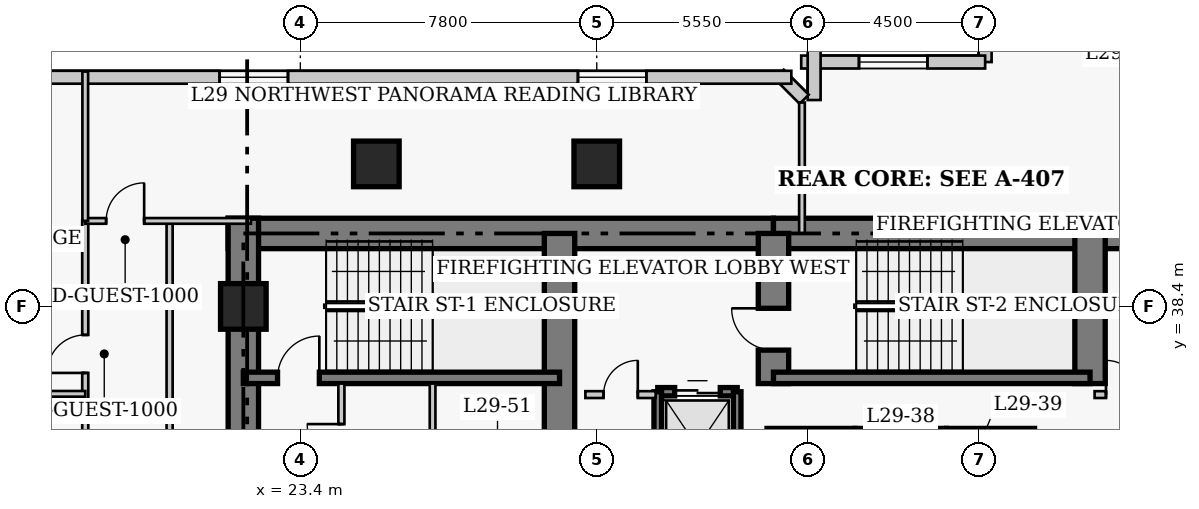
"""IFC4 building model, lengths in metres.
Left out: names, types, materials, properties, quantities, classifications, styles, units other than length and angle.
Written with IfcOpenShell. Run it as: python <this file> out.ifc"""

import sys

from ifc_helpers import new_model, si_unit, direction, frame, frame_2d, origin, origin_2d, place, context, subcontext, project, spatial, rectangle, extrude, element, fill, save


model = new_model("IFC4")
c1 = context("Model", 3, precision=1e-05, world=origin(), true_north=direction((0.0, 1.0)))
c2 = subcontext(c1, "Body", "Model", "MODEL_VIEW")
j1 = project(units=[si_unit("LENGTHUNIT", "METRE"), si_unit("PLANEANGLEUNIT", "RADIAN")], contexts=[c1])
p1 = place(None, origin())
s1 = spatial("IfcSite", under=j1, at=p1, CompositionType="ELEMENT")
p2 = place(p1, origin())
s2 = spatial("IfcBuilding", under=s1, at=p2, CompositionType="ELEMENT")
p3 = place(p2, frame((0.0, 0.0, 118.4)))
s3 = spatial("IfcBuildingStorey", under=s2, at=p3, CompositionType="ELEMENT", Elevation=118.4)
p4 = place(p3, frame((21.5, 40.32, 0.0), z_axis=(0.0, 0.0, 1.0), x_axis=(1.0, 0.0, 0.0)))
e1 = element("IfcWall", 1, at=p4, inside=s3, PredefinedType="SHEAR", context=c2, shape_type="SweptSolid", body=[
    extrude(rectangle(XDim=14.35, YDim=0.8, at=frame_2d((7.175, 0.0))), origin(), (0.0, 0.0, 1.0), 3.8),
])
p5 = place(p3, frame((35.85, 40.32, 0.0), z_axis=(0.0, 0.0, 1.0), x_axis=(1.0, 0.0, 0.0)))
e2 = element("IfcWall", 2, at=p5, inside=s3, PredefinedType="SHEAR", context=c2, shape_type="SweptSolid", body=[
    extrude(rectangle(XDim=12.6, YDim=0.8, at=frame_2d((6.3, 0.0))), origin(), (0.0, 0.0, 1.0), 3.8),
])
p6 = place(p3, frame((21.9, 27.05, 0.0), z_axis=(0.0, 0.0, 1.0), x_axis=(0.0, 1.0, 0.0)))
e3 = element("IfcWall", 3, at=p6, inside=s3, PredefinedType="SHEAR", context=c2, shape_type="SweptSolid", body=[
    extrude(rectangle(XDim=13.67, YDim=0.8, at=frame_2d((6.835, 0.0))), origin(), (0.0, 0.0, 1.0), 3.8),
])
p7 = place(p3, frame((30.22, 33.15, 0.0), z_axis=(0.0, 0.0, 1.0), x_axis=(0.0, 1.0, 0.0)))
e4 = element("IfcWall", 4, at=p7, inside=s3, PredefinedType="SHEAR", context=c2, shape_type="SweptSolid", body=[
    extrude(rectangle(XDim=7.17, YDim=0.8, at=frame_2d((3.585, 0.0))), origin(), (0.0, 0.0, 1.0), 3.8),
])
p8 = place(p3, frame((35.85, 36.37, 0.0), z_axis=(0.0, 0.0, 1.0), x_axis=(0.0, 1.0, 0.0)))
e5 = element("IfcWall", 5, at=p8, inside=s3, PredefinedType="SHEAR", context=c2, shape_type="SweptSolid", body=[
    extrude(rectangle(XDim=3.95, YDim=0.8, at=frame_2d((1.975, 0.0))), origin(), (0.0, 0.0, 1.0), 3.8),
])
p9 = place(p8, frame((0.88, 0.0, 0.0)))
e6 = element("IfcOpeningElement", 6, at=p9, cuts=e5, PredefinedType="OPENING", context=c2, shape_type="SweptSolid", body=[
    extrude(rectangle(XDim=1.1, YDim=2.15, at=frame_2d((0.55, 1.075))), frame((0.0, 0.41, 0.0), z_axis=(0.0, -1.0, 0.0), x_axis=(1.0, 0.0, 0.0)), (0.0, 0.0, 1.0), 0.82),
])
p10 = place(p3, frame((44.18, 36.37, 0.0), z_axis=(0.0, 0.0, 1.0), x_axis=(0.0, 1.0, 0.0)))
e7 = element("IfcWall", 7, at=p10, inside=s3, PredefinedType="SHEAR", context=c2, shape_type="SweptSolid", body=[
    extrude(rectangle(XDim=3.95, YDim=0.8, at=frame_2d((1.975, 0.0))), origin(), (0.0, 0.0, 1.0), 3.8),
])
p11 = place(p3, frame((21.9, 36.52, 0.0), z_axis=(0.0, 0.0, 1.0), x_axis=(1.0, 0.0, 0.0)))
e8 = element("IfcWall", 8, at=p11, inside=s3, PredefinedType="SHEAR", context=c2, shape_type="SweptSolid", body=[
    extrude(rectangle(XDim=8.32, YDim=0.3, at=frame_2d((4.16, 0.0))), origin(), (0.0, 0.0, 1.0), 3.8),
])
p12 = place(p11, frame((0.9, 0.0, 0.0)))
e9 = element("IfcOpeningElement", 9, at=p12, cuts=e8, PredefinedType="OPENING", context=c2, shape_type="SweptSolid", body=[
    extrude(rectangle(XDim=1.1, YDim=2.15, at=frame_2d((0.55, 1.075))), frame((0.0, 0.16, 0.0), z_axis=(0.0, -1.0, 0.0), x_axis=(1.0, 0.0, 0.0)), (0.0, 0.0, 1.0), 0.32),
])
p13 = place(p3, frame((35.85, 36.52, 0.0), z_axis=(0.0, 0.0, 1.0), x_axis=(1.0, 0.0, 0.0)))
e10 = element("IfcWall", 10, at=p13, inside=s3, PredefinedType="SHEAR", context=c2, shape_type="SweptSolid", body=[
    extrude(rectangle(XDim=8.33, YDim=0.3, at=frame_2d((4.165, 0.0))), origin(), (0.0, 0.0, 1.0), 3.8),
])
for number, where, z_axis, x_axis in (
    (11, (21.9, 38.4, 0.0), (0.0, 0.0, 1.0), (1.0, 0.0, 0.0)),
    (12, (25.4, 42.15, 0.0), (0.0, 0.0, 1.0), (1.0, 0.0, 0.0)),
    (13, (31.2, 42.15, 0.0), (0.0, 0.0, 1.0), (1.0, 0.0, 0.0)),
):
    element("IfcColumn", number, at=place(p3, frame(where, z_axis=z_axis, x_axis=x_axis)), inside=s3, PredefinedType="COLUMN", context=c2, shape_type="SweptSolid", body=[
        extrude(rectangle(XDim=1.2, YDim=1.2, at=origin_2d()), origin(), (0.0, 0.0, 1.0), 3.8),
    ])
p14 = place(p3, frame((41.42, 49.37, 0.0), z_axis=(0.0, 0.0, 1.0), x_axis=(0.0, -1.0, 0.0)))
e14 = element("IfcWall", 14, at=p14, inside=s3, PredefinedType="SOLIDWALL", context=c2, shape_type="SweptSolid", body=[
    extrude(rectangle(XDim=4.54, YDim=0.34, at=frame_2d((2.27, 0.0))), origin(), (0.0, 0.0, 1.0), 3.54),
])
p15 = place(p14, frame((1.37, 0.0, 0.85)))
e15 = element("IfcOpeningElement", 15, at=p15, cuts=e14, PredefinedType="OPENING", context=c2, shape_type="SweptSolid", body=[
    extrude(rectangle(XDim=1.8, YDim=1.8, at=frame_2d((0.9, 0.9))), frame((0.0, 0.18, 0.0), z_axis=(0.0, -1.0, 0.0), x_axis=(1.0, 0.0, 0.0)), (0.0, 0.0, 1.0), 0.36),
])
p16 = place(p3, frame((41.42, 44.83, 0.0), z_axis=(0.0, 0.0, 1.0), x_axis=(-1.0, 0.0, 0.0)))
e16 = element("IfcWall", 16, at=p16, inside=s3, PredefinedType="SOLIDWALL", context=c2, shape_type="SweptSolid", body=[
    extrude(rectangle(XDim=4.84, YDim=0.34, at=frame_2d((2.42, 0.0))), origin(), (0.0, 0.0, 1.0), 3.54),
])
p17 = place(p16, frame((1.52, 0.0, 0.85)))
e17 = element("IfcOpeningElement", 17, at=p17, cuts=e16, PredefinedType="OPENING", context=c2, shape_type="SweptSolid", body=[
    extrude(rectangle(XDim=1.8, YDim=1.8, at=frame_2d((0.9, 0.9))), frame((0.0, 0.18, 0.0), z_axis=(0.0, -1.0, 0.0), x_axis=(1.0, 0.0, 0.0)), (0.0, 0.0, 1.0), 0.36),
])
p18 = place(p3, frame((36.92, 45.17, 0.0), z_axis=(0.0, 0.0, 1.0), x_axis=(0.0, -1.0, 0.0)))
e18 = element("IfcWall", 18, at=p18, inside=s3, PredefinedType="SOLIDWALL", context=c2, shape_type="SweptSolid", body=[
    extrude(rectangle(XDim=1.34, YDim=0.34, at=frame_2d((0.67, 0.0))), origin(), (0.0, 0.0, 1.0), 3.54),
])
p19 = place(p3, frame((36.658, 43.852, 0.0), z_axis=(0.0, 0.0, 1.0), x_axis=(-0.707238225886, 0.706975312048, 0.0)))
e19 = element("IfcWall", 19, at=p19, inside=s3, PredefinedType="SOLIDWALL", context=c2, shape_type="SweptSolid", body=[
    extrude(rectangle(XDim=0.929, YDim=0.34, at=frame_2d((0.464, 0.0))), origin(), (0.0, 0.0, 1.0), 3.54),
])
p20 = place(p3, frame((36.32, 44.43, 0.0), z_axis=(0.0, 0.0, 1.0), x_axis=(-1.0, 0.0, 0.0)))
e20 = element("IfcWall", 20, at=p20, inside=s3, PredefinedType="SOLIDWALL", context=c2, shape_type="SweptSolid", body=[
    extrude(rectangle(XDim=28.29, YDim=0.34, at=frame_2d((14.145, 0.0))), origin(), (0.0, 0.0, 1.0), 3.54),
])
p21 = place(p20, frame((3.815, 0.0, 0.85)))
e21 = element("IfcOpeningElement", 21, at=p21, cuts=e20, PredefinedType="OPENING", context=c2, shape_type="SweptSolid", body=[
    extrude(rectangle(XDim=1.8, YDim=1.8, at=frame_2d((0.9, 0.9))), frame((0.0, 0.18, 0.0), z_axis=(0.0, -1.0, 0.0), x_axis=(1.0, 0.0, 0.0)), (0.0, 0.0, 1.0), 0.36),
])
p22 = place(p20, frame((13.245, 0.0, 0.85)))
e22 = element("IfcOpeningElement", 22, at=p22, cuts=e20, PredefinedType="OPENING", context=c2, shape_type="SweptSolid", body=[
    extrude(rectangle(XDim=1.8, YDim=1.8, at=frame_2d((0.9, 0.9))), frame((0.0, 0.18, 0.0), z_axis=(0.0, -1.0, 0.0), x_axis=(1.0, 0.0, 0.0)), (0.0, 0.0, 1.0), 0.36),
])
p23 = place(p20, frame((22.675, 0.0, 0.85)))
e23 = element("IfcOpeningElement", 23, at=p23, cuts=e20, PredefinedType="OPENING", context=c2, shape_type="SweptSolid", body=[
    extrude(rectangle(XDim=1.8, YDim=1.8, at=frame_2d((0.9, 0.9))), frame((0.0, 0.18, 0.0), z_axis=(0.0, -1.0, 0.0), x_axis=(1.0, 0.0, 0.0)), (0.0, 0.0, 1.0), 0.36),
])
p24 = place(p3, frame((35.68, 35.08, 0.0), z_axis=(0.0, 0.0, 1.0), x_axis=(1.0, 0.0, 0.0)))
e24 = element("IfcWall", 24, at=p24, inside=s3, PredefinedType="SHEAR", context=c2, shape_type="SweptSolid", body=[
    extrude(rectangle(XDim=2.32, YDim=0.22, at=frame_2d((1.16, 0.0))), origin(), (0.0, 0.0, 1.0), 3.8),
])
p25 = place(p3, frame((38.0, 35.08, 0.0), z_axis=(0.0, 0.0, 1.0), x_axis=(1.0, 0.0, 0.0)))
e25 = element("IfcWall", 25, at=p25, inside=s3, PredefinedType="SHEAR", context=c2, shape_type="SweptSolid", body=[
    extrude(rectangle(XDim=2.4, YDim=0.22, at=frame_2d((1.2, 0.0))), origin(), (0.0, 0.0, 1.0), 3.8),
])
p26 = place(p3, frame((40.4, 35.08, 0.0), z_axis=(0.0, 0.0, 1.0), x_axis=(1.0, 0.0, 0.0)))
e26 = element("IfcWall", 26, at=p26, inside=s3, PredefinedType="SHEAR", context=c2, shape_type="SweptSolid", body=[
    extrude(rectangle(XDim=2.32, YDim=0.22, at=frame_2d((1.16, 0.0))), origin(), (0.0, 0.0, 1.0), 3.8),
])
p27 = place(p3, frame((32.805, 36.155, 0.0), z_axis=(0.0, 0.0, 1.0), x_axis=(1.0, 0.0, 0.0)))
e27 = element("IfcWall", 27, at=p27, inside=s3, PredefinedType="SHEAR", context=c2, shape_type="SweptSolid", body=[
    extrude(rectangle(XDim=2.09, YDim=0.22, at=frame_2d((1.045, 0.0))), origin(), (0.0, 0.0, 1.0), 3.8),
])
p28 = place(p27, frame((0.445, 0.0, 0.0)))
e28 = element("IfcOpeningElement", 28, at=p28, cuts=e27, PredefinedType="OPENING", context=c2, shape_type="SweptSolid", body=[
    extrude(rectangle(XDim=1.2, YDim=2.15, at=frame_2d((0.6, 1.075))), frame((0.0, 0.12, 0.0), z_axis=(0.0, -1.0, 0.0), x_axis=(1.0, 0.0, 0.0)), (0.0, 0.0, 1.0), 0.24),
])
for number, where, z_axis, x_axis in (
    (29, (32.805, 33.245, 0.0), (0.0, 0.0, 1.0), (0.0, 1.0, 0.0)),
    (30, (34.895, 33.245, 0.0), (0.0, 0.0, 1.0), (0.0, 1.0, 0.0)),
):
    element("IfcWall", number, at=place(p3, frame(where, z_axis=z_axis, x_axis=x_axis)), inside=s3, PredefinedType="SHEAR", context=c2, shape_type="SweptSolid", body=[
        extrude(rectangle(XDim=2.91, YDim=0.2, at=frame_2d((1.455, 0.0))), origin(), (0.0, 0.0, 1.0), 3.8),
    ])
p29 = place(p3, frame((30.9, 36.08, 0.0), z_axis=(0.0, 0.0, 1.0), x_axis=(1.0, 0.0, 0.0)))
e31 = element("IfcWall", 31, at=p29, inside=s3, PredefinedType="PARTITIONING", context=c2, shape_type="SweptSolid", body=[
    extrude(rectangle(XDim=1.85, YDim=0.18, at=frame_2d((0.925, 0.0))), origin(), (0.0, 0.0, 1.0), 3.54),
])
p30 = place(p29, frame((0.48, 0.0, 0.0)))
e32 = element("IfcOpeningElement", 32, at=p30, cuts=e31, PredefinedType="OPENING", context=c2, shape_type="SweptSolid", body=[
    extrude(rectangle(XDim=0.9, YDim=2.15, at=frame_2d((0.45, 1.075))), frame((0.0, 0.1, 0.0), z_axis=(0.0, -1.0, 0.0), x_axis=(1.0, 0.0, 0.0)), (0.0, 0.0, 1.0), 0.2),
])
p31 = place(p3, frame((44.3, 36.08, 0.0), z_axis=(0.0, 0.0, 1.0), x_axis=(1.0, 0.0, 0.0)))
e33 = element("IfcWall", 33, at=p31, inside=s3, PredefinedType="PARTITIONING", context=c2, shape_type="SweptSolid", body=[
    extrude(rectangle(XDim=1.5, YDim=0.18, at=frame_2d((0.75, 0.0))), origin(), (0.0, 0.0, 1.0), 3.54),
])
p32 = place(p31, frame((0.3, 0.0, 0.0)))
e34 = element("IfcOpeningElement", 34, at=p32, cuts=e33, PredefinedType="OPENING", context=c2, shape_type="SweptSolid", body=[
    extrude(rectangle(XDim=0.9, YDim=2.15, at=frame_2d((0.45, 1.075))), frame((0.0, 0.1, 0.0), z_axis=(0.0, -1.0, 0.0), x_axis=(1.0, 0.0, 0.0)), (0.0, 0.0, 1.0), 0.2),
])
p33 = place(p3, frame((24.48, 32.8, 0.0), z_axis=(0.0, 0.0, 1.0), x_axis=(0.0, 1.0, 0.0)))
e35 = element("IfcWall", 35, at=p33, inside=s3, PredefinedType="PARTITIONING", context=c2, shape_type="SweptSolid", body=[
    extrude(rectangle(XDim=3.57, YDim=0.16, at=frame_2d((1.785, 0.0))), origin(), (0.0, 0.0, 1.0), 3.54),
])
p34 = place(p33, frame((1.604, 0.0, 0.0)))
e36 = element("IfcOpeningElement", 36, at=p34, cuts=e35, PredefinedType="OPENING", context=c2, shape_type="SweptSolid", body=[
    extrude(rectangle(XDim=0.9, YDim=2.1, at=frame_2d((0.45, 1.05))), frame((0.0, 0.09, 0.0), z_axis=(0.0, -1.0, 0.0), x_axis=(1.0, 0.0, 0.0)), (0.0, 0.0, 1.0), 0.18),
])
p35 = place(p3, frame((26.88, 32.75, 0.0), z_axis=(0.0, 0.0, 1.0), x_axis=(0.0, 1.0, 0.0)))
e37 = element("IfcWall", 37, at=p35, inside=s3, PredefinedType="PARTITIONING", context=c2, shape_type="SweptSolid", body=[
    extrude(rectangle(XDim=3.62, YDim=0.15, at=frame_2d((1.81, 0.0))), origin(), (0.0, 0.0, 1.0), 3.54),
])
p36 = place(p3, frame((17.74, 6.65, 0.0), z_axis=(0.0, 0.0, 1.0), x_axis=(0.0, 1.0, 0.0)))
e38 = element("IfcWall", 38, at=p36, inside=s3, PredefinedType="PARTITIONING", context=c2, shape_type="SweptSolid", body=[
    extrude(rectangle(XDim=34.0, YDim=0.16, at=frame_2d((17.0, 0.0))), origin(), (0.0, 0.0, 1.0), 3.54),
])
p37 = place(p36, frame((1.8, 0.0, 0.0)))
e39 = element("IfcOpeningElement", 39, at=p37, cuts=e38, PredefinedType="OPENING", context=c2, shape_type="SweptSolid", body=[
    extrude(rectangle(XDim=0.95, YDim=2.1, at=frame_2d((0.475, 1.05))), frame((0.0, 0.09, 0.0), z_axis=(0.0, -1.0, 0.0), x_axis=(1.0, 0.0, 0.0)), (0.0, 0.0, 1.0), 0.18),
])
p38 = place(p36, frame((8.475, 0.0, 0.0)))
e40 = element("IfcOpeningElement", 40, at=p38, cuts=e38, PredefinedType="OPENING", context=c2, shape_type="SweptSolid", body=[
    extrude(rectangle(XDim=0.95, YDim=2.1, at=frame_2d((0.475, 1.05))), frame((0.0, 0.09, 0.0), z_axis=(0.0, -1.0, 0.0), x_axis=(1.0, 0.0, 0.0)), (0.0, 0.0, 1.0), 0.18),
])
p39 = place(p36, frame((14.255, 0.0, 0.0)))
e41 = element("IfcOpeningElement", 41, at=p39, cuts=e38, PredefinedType="OPENING", context=c2, shape_type="SweptSolid", body=[
    extrude(rectangle(XDim=0.95, YDim=2.1, at=frame_2d((0.475, 1.05))), frame((0.0, 0.09, 0.0), z_axis=(0.0, -1.0, 0.0), x_axis=(1.0, 0.0, 0.0)), (0.0, 0.0, 1.0), 0.18),
])
p40 = place(p36, frame((30.0, 0.0, 0.0)))
e42 = element("IfcOpeningElement", 42, at=p40, cuts=e38, PredefinedType="OPENING", context=c2, shape_type="SweptSolid", body=[
    extrude(rectangle(XDim=1.0, YDim=2.15, at=frame_2d((0.5, 1.075))), frame((0.0, 0.09, 0.0), z_axis=(0.0, -1.0, 0.0), x_axis=(1.0, 0.0, 0.0)), (0.0, 0.0, 1.0), 0.18),
])
p41 = place(p3, frame((19.96, 35.02, 0.0), z_axis=(0.0, 0.0, 1.0), x_axis=(0.0, 1.0, 0.0)))
e43 = element("IfcWall", 43, at=p41, inside=s3, PredefinedType="PARTITIONING", context=c2, shape_type="SweptSolid", body=[
    extrude(rectangle(XDim=5.63, YDim=0.16, at=frame_2d((2.815, 0.0))), origin(), (0.0, 0.0, 1.0), 3.54),
])
p42 = place(p3, frame((17.74, 40.65, 0.0), z_axis=(0.0, 0.0, 1.0), x_axis=(1.0, 0.0, 0.0)))
e44 = element("IfcWall", 44, at=p42, inside=s3, PredefinedType="PARTITIONING", context=c2, shape_type="SweptSolid", body=[
    extrude(rectangle(XDim=4.36, YDim=0.15, at=frame_2d((2.18, 0.0))), origin(), (0.0, 0.0, 1.0), 3.54),
])
p43 = place(p42, frame((0.55, 0.0, 0.0)))
e45 = element("IfcOpeningElement", 45, at=p43, cuts=e44, PredefinedType="OPENING", context=c2, shape_type="SweptSolid", body=[
    extrude(rectangle(XDim=1.0, YDim=2.15, at=frame_2d((0.5, 1.075))), frame((0.0, 0.085, 0.0), z_axis=(0.0, -1.0, 0.0), x_axis=(1.0, 0.0, 0.0)), (0.0, 0.0, 1.0), 0.17),
])
p44 = place(p3, frame((17.74, 40.65, 0.0), z_axis=(0.0, 0.0, 1.0), x_axis=(0.0, 1.0, 0.0)))
e46 = element("IfcWall", 46, at=p44, inside=s3, PredefinedType="PARTITIONING", context=c2, shape_type="SweptSolid", body=[
    extrude(rectangle(XDim=3.93, YDim=0.15, at=frame_2d((1.965, 0.0))), origin(), (0.0, 0.0, 1.0), 3.54),
])
p45 = place(p3, frame((36.6, 40.32, 0.0), z_axis=(0.0, 0.0, 1.0), x_axis=(0.0, 1.0, 0.0)))
e47 = element("IfcWall", 47, at=p45, inside=s3, PredefinedType="PARTITIONING", context=c2, shape_type="SweptSolid", body=[
    extrude(rectangle(XDim=3.445, YDim=0.15, at=frame_2d((1.723, 0.0))), origin(), (0.0, 0.0, 1.0), 3.54),
])
p46 = place(p3, frame((14.45, 36.1, 0.0), z_axis=(0.0, 0.0, 1.0), x_axis=(1.0, 0.0, 0.0)))
e48 = element("IfcWall", 48, at=p46, inside=s3, PredefinedType="PARTITIONING", context=c2, shape_type="SweptSolid", body=[
    extrude(rectangle(XDim=3.29, YDim=0.15, at=frame_2d((1.645, 0.0))), origin(), (0.0, 0.0, 1.0), 3.54),
])
p47 = place(p17, origin())
e49 = element("IfcWindow", 49, at=p47, inside=s3, PartitioningType="SINGLE_PANEL", PredefinedType="WINDOW", context=c2, shape_type="SweptSolid", body=[
    extrude(rectangle(XDim=1.8, YDim=1.8, at=frame_2d((0.9, 0.9))), frame((0.0, 0.03, 0.0), z_axis=(0.0, -1.0, 0.0), x_axis=(1.0, 0.0, 0.0)), (0.0, 0.0, 1.0), 0.06),
])
fill(e17, e49)
p48 = place(p21, origin())
e50 = element("IfcWindow", 50, at=p48, inside=s3, PartitioningType="SINGLE_PANEL", PredefinedType="WINDOW", context=c2, shape_type="SweptSolid", body=[
    extrude(rectangle(XDim=1.8, YDim=1.8, at=frame_2d((0.9, 0.9))), frame((0.0, 0.03, 0.0), z_axis=(0.0, -1.0, 0.0), x_axis=(1.0, 0.0, 0.0)), (0.0, 0.0, 1.0), 0.06),
])
fill(e21, e50)
p49 = place(p22, origin())
e51 = element("IfcWindow", 51, at=p49, inside=s3, PartitioningType="SINGLE_PANEL", PredefinedType="WINDOW", context=c2, shape_type="SweptSolid", body=[
    extrude(rectangle(XDim=1.8, YDim=1.8, at=frame_2d((0.9, 0.9))), frame((0.0, 0.03, 0.0), z_axis=(0.0, -1.0, 0.0), x_axis=(1.0, 0.0, 0.0)), (0.0, 0.0, 1.0), 0.06),
])
fill(e22, e51)
p50 = place(p28, origin())
e52 = element("IfcDoor", 52, at=p50, inside=s3, OperationType="DOUBLE_DOOR_SLIDING", PredefinedType="DOOR", context=c2, shape_type="SweptSolid", body=[
    extrude(rectangle(XDim=1.2, YDim=2.15, at=frame_2d((0.6, 1.075))), frame((0.0, 0.025, 0.0), z_axis=(0.0, -1.0, 0.0), x_axis=(1.0, 0.0, 0.0)), (0.0, 0.0, 1.0), 0.05),
])
fill(e28, e52)
p51 = place(p30, origin())
e53 = element("IfcDoor", 53, at=p51, inside=s3, OperationType="SINGLE_SWING_RIGHT", PredefinedType="DOOR", context=c2, shape_type="SweptSolid", body=[
    extrude(rectangle(XDim=0.9, YDim=2.15, at=frame_2d((0.45, 1.075))), frame((0.0, 0.025, 0.0), z_axis=(0.0, -1.0, 0.0), x_axis=(1.0, 0.0, 0.0)), (0.0, 0.0, 1.0), 0.05),
])
fill(e32, e53)
p52 = place(p32, origin())
e54 = element("IfcDoor", 54, at=p52, inside=s3, OperationType="SINGLE_SWING_LEFT", PredefinedType="DOOR", context=c2, shape_type="SweptSolid", body=[
    extrude(rectangle(XDim=0.9, YDim=2.15, at=frame_2d((0.45, 1.075))), frame((0.0, 0.025, 0.0), z_axis=(0.0, -1.0, 0.0), x_axis=(1.0, 0.0, 0.0)), (0.0, 0.0, 1.0), 0.05),
])
fill(e34, e54)
p53 = place(p34, origin())
e55 = element("IfcDoor", 55, at=p53, inside=s3, OperationType="SINGLE_SWING_RIGHT", PredefinedType="DOOR", context=c2, shape_type="SweptSolid", body=[
    extrude(rectangle(XDim=0.9, YDim=2.1, at=frame_2d((0.45, 1.05))), frame((0.0, 0.025, 0.0), z_axis=(0.0, -1.0, 0.0), x_axis=(1.0, 0.0, 0.0)), (0.0, 0.0, 1.0), 0.05),
])
fill(e36, e55)
p54 = place(p43, origin())
e56 = element("IfcDoor", 56, at=p54, inside=s3, OperationType="SINGLE_SWING_RIGHT", PredefinedType="DOOR", context=c2, shape_type="SweptSolid", body=[
    extrude(rectangle(XDim=1.0, YDim=2.15, at=frame_2d((0.5, 1.075))), frame((0.0, 0.025, 0.0), z_axis=(0.0, -1.0, 0.0), x_axis=(1.0, 0.0, 0.0)), (0.0, 0.0, 1.0), 0.05),
])
fill(e45, e56)
p55 = place(p40, origin())
e57 = element("IfcDoor", 57, at=p55, inside=s3, OperationType="SINGLE_SWING_LEFT", PredefinedType="DOOR", context=c2, shape_type="SweptSolid", body=[
    extrude(rectangle(XDim=1.0, YDim=2.15, at=frame_2d((0.5, 1.075))), frame((0.0, 0.025, 0.0), z_axis=(0.0, -1.0, 0.0), x_axis=(1.0, 0.0, 0.0)), (0.0, 0.0, 1.0), 0.05),
])
fill(e42, e57)
p56 = place(p12, origin())
e58 = element("IfcDoor", 58, at=p56, inside=s3, OperationType="SINGLE_SWING_RIGHT", PredefinedType="DOOR", context=c2, shape_type="SweptSolid", body=[
    extrude(rectangle(XDim=1.1, YDim=2.15, at=frame_2d((0.55, 1.075))), frame((0.0, 0.025, 0.0), z_axis=(0.0, -1.0, 0.0), x_axis=(1.0, 0.0, 0.0)), (0.0, 0.0, 1.0), 0.05),
])
fill(e9, e58)
p57 = place(p9, origin())
e59 = element("IfcDoor", 59, at=p57, inside=s3, OperationType="SINGLE_SWING_RIGHT", PredefinedType="DOOR", context=c2, shape_type="SweptSolid", body=[
    extrude(rectangle(XDim=1.1, YDim=2.15, at=frame_2d((0.55, 1.075))), frame((0.0, 0.025, 0.0), z_axis=(0.0, -1.0, 0.0), x_axis=(1.0, 0.0, 0.0)), (0.0, 0.0, 1.0), 0.05),
])
fill(e6, e59)
save(model, sys.argv[1])
